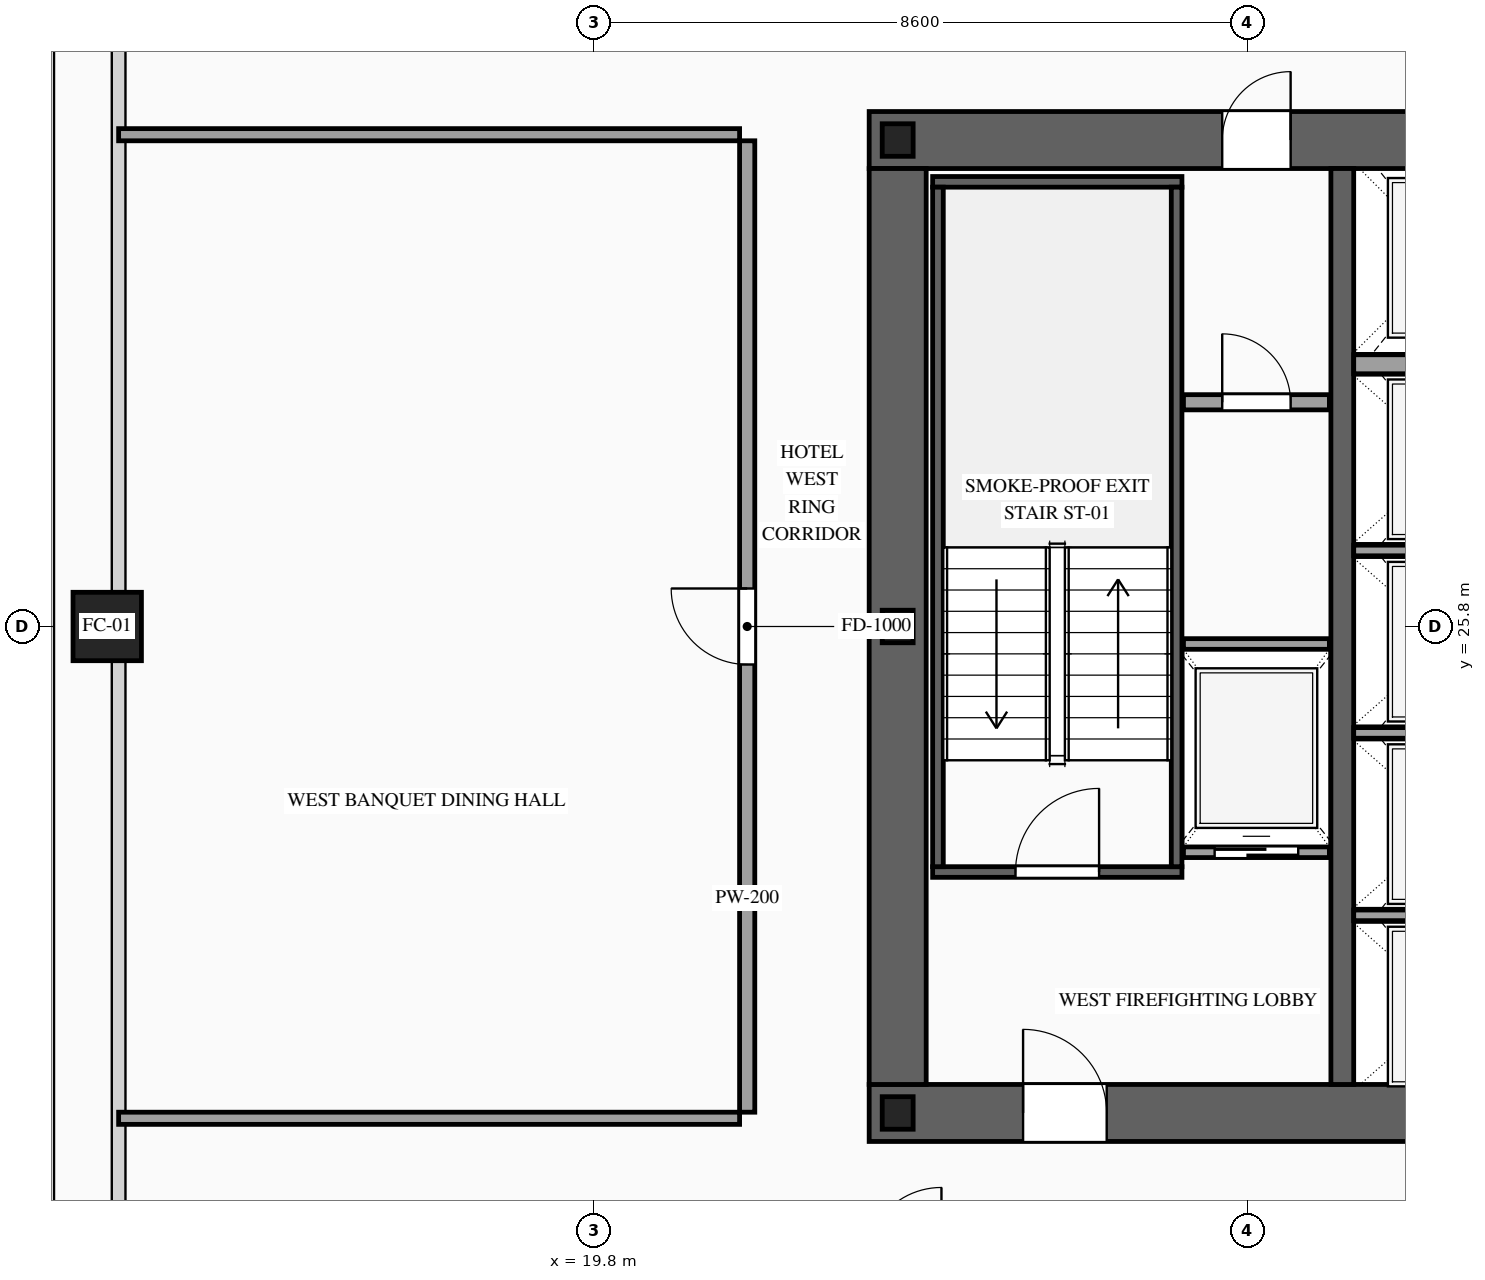
"""IFC4 building model, lengths in metres.
Left out: names, types, materials, properties, quantities, classifications, styles, units other than length and angle.
Written with IfcOpenShell. Run it as: python <this file> out.ifc"""

import sys

from ifc_helpers import new_model, si_unit, direction, frame, frame_2d, origin, origin_2d, place, context, subcontext, project, spatial, rectangle, hollow_rectangle, i_section, extrude, source, transform, mapped, element, fill, save


model = new_model("IFC4")
c1 = context("Model", 3, precision=1e-05, world=origin(), true_north=direction((0.0, 1.0)))
c2 = subcontext(c1, "Body", "Model", "MODEL_VIEW")
j1 = project(units=[si_unit("LENGTHUNIT", "METRE"), si_unit("PLANEANGLEUNIT", "RADIAN")], contexts=[c1])
p1 = place(None, origin())
s1 = spatial("IfcSite", under=j1, at=p1, CompositionType="ELEMENT")
p2 = place(p1, origin())
s2 = spatial("IfcBuilding", under=s1, at=p2, CompositionType="ELEMENT")
p3 = place(p2, frame((0.0, 0.0, 126.2)))
s3 = spatial("IfcBuildingStorey", under=s2, at=p3, CompositionType="ELEMENT", Elevation=126.2)
p4 = place(p3, frame((23.425, 19.4, 0.0), z_axis=(0.0, 0.0, 1.0), x_axis=(1.0, 0.0, 0.0)))
e1 = element("IfcWall", 1, at=p4, inside=s3, PredefinedType="SHEAR", context=c2, shape_type="SweptSolid", body=[
    extrude(rectangle(XDim=27.15, YDim=0.75, at=frame_2d((13.575, 0.0))), origin(), (0.0, 0.0, 1.0), 3.6),
])
p5 = place(p4, frame((2.025, 0.0, 0.0)))
e2 = element("IfcOpeningElement", 2, at=p5, cuts=e1, PredefinedType="OPENING", context=c2, shape_type="SweptSolid", body=[
    extrude(rectangle(XDim=1.1, YDim=2.2, at=frame_2d((0.55, 1.1))), frame((0.0, 0.39, 0.0), z_axis=(0.0, -1.0, 0.0), x_axis=(1.0, 0.0, 0.0)), (0.0, 0.0, 1.0), 0.78),
])
p6 = place(p4, frame((9.925, 0.0, 0.0)))
e3 = element("IfcOpeningElement", 3, at=p6, cuts=e1, PredefinedType="OPENING", context=c2, shape_type="SweptSolid", body=[
    extrude(rectangle(XDim=1.1, YDim=2.2, at=frame_2d((0.55, 1.1))), frame((0.0, 0.39, 0.0), z_axis=(0.0, -1.0, 0.0), x_axis=(1.0, 0.0, 0.0)), (0.0, 0.0, 1.0), 0.78),
])
p7 = place(p4, frame((23.125, 0.0, 0.0)))
e4 = element("IfcOpeningElement", 4, at=p7, cuts=e1, PredefinedType="OPENING", context=c2, shape_type="SweptSolid", body=[
    extrude(rectangle(XDim=1.1, YDim=2.2, at=frame_2d((0.55, 1.1))), frame((0.0, 0.39, 0.0), z_axis=(0.0, -1.0, 0.0), x_axis=(1.0, 0.0, 0.0)), (0.0, 0.0, 1.0), 0.78),
])
p8 = place(p4, frame((19.745, 0.0, 0.0)))
e5 = element("IfcOpeningElement", 5, at=p8, cuts=e1, PredefinedType="OPENING", context=c2, shape_type="SweptSolid", body=[
    extrude(rectangle(XDim=0.9, YDim=2.15, at=frame_2d((0.45, 1.075))), frame((0.0, 0.39, 0.0), z_axis=(0.0, -1.0, 0.0), x_axis=(1.0, 0.0, 0.0)), (0.0, 0.0, 1.0), 0.78),
])
p9 = place(p4, frame((18.305, 0.0, 0.0)))
e6 = element("IfcOpeningElement", 6, at=p9, cuts=e1, PredefinedType="OPENING", context=c2, shape_type="SweptSolid", body=[
    extrude(rectangle(XDim=0.9, YDim=2.15, at=frame_2d((0.45, 1.075))), frame((0.0, 0.39, 0.0), z_axis=(0.0, -1.0, 0.0), x_axis=(1.0, 0.0, 0.0)), (0.0, 0.0, 1.0), 0.78),
])
p10 = place(p3, frame((23.425, 32.2, 0.0), z_axis=(0.0, 0.0, 1.0), x_axis=(1.0, 0.0, 0.0)))
e7 = element("IfcWall", 7, at=p10, inside=s3, PredefinedType="SHEAR", context=c2, shape_type="SweptSolid", body=[
    extrude(rectangle(XDim=27.15, YDim=0.75, at=frame_2d((13.575, 0.0))), origin(), (0.0, 0.0, 1.0), 3.6),
])
p11 = place(p10, frame((4.645, 0.0, 0.0)))
e8 = element("IfcOpeningElement", 8, at=p11, cuts=e7, PredefinedType="OPENING", context=c2, shape_type="SweptSolid", body=[
    extrude(rectangle(XDim=0.9, YDim=2.15, at=frame_2d((0.45, 1.075))), frame((0.0, 0.39, 0.0), z_axis=(0.0, -1.0, 0.0), x_axis=(1.0, 0.0, 0.0)), (0.0, 0.0, 1.0), 0.78),
])
p12 = place(p10, frame((9.925, 0.0, 0.0)))
e9 = element("IfcOpeningElement", 9, at=p12, cuts=e7, PredefinedType="OPENING", context=c2, shape_type="SweptSolid", body=[
    extrude(rectangle(XDim=1.1, YDim=2.2, at=frame_2d((0.55, 1.1))), frame((0.0, 0.39, 0.0), z_axis=(0.0, -1.0, 0.0), x_axis=(1.0, 0.0, 0.0)), (0.0, 0.0, 1.0), 0.78),
])
p13 = place(p10, frame((15.775, 0.0, 0.0)))
e10 = element("IfcOpeningElement", 10, at=p13, cuts=e7, PredefinedType="OPENING", context=c2, shape_type="SweptSolid", body=[
    extrude(rectangle(XDim=1.1, YDim=2.2, at=frame_2d((0.55, 1.1))), frame((0.0, 0.39, 0.0), z_axis=(0.0, -1.0, 0.0), x_axis=(1.0, 0.0, 0.0)), (0.0, 0.0, 1.0), 0.78),
])
m1 = source(origin(), c2, "Body", "SweptSolid", [
    extrude(rectangle(XDim=12.05, YDim=0.75, at=frame_2d((6.025, 0.0))), origin(), (0.0, 0.0, 1.0), 3.6),
])
p14 = place(p3, frame((23.8, 19.775, 0.0), z_axis=(0.0, 0.0, 1.0), x_axis=(0.0, 1.0, 0.0)))
e11 = element("IfcWall", 11, at=p14, inside=s3, PredefinedType="SHEAR", context=c2, shape_type="MappedRepresentation", body=[
    mapped(m1, transform((0.0, 0.0, 0.0), scale=1.0)),
])
m2 = source(origin(), c2, "Body", "SweptSolid", [
    extrude(rectangle(XDim=12.05, YDim=0.3, at=frame_2d((6.025, 0.0))), origin(), (0.0, 0.0, 1.0), 3.6),
])
p15 = place(p3, frame((29.65, 19.775, 0.0), z_axis=(0.0, 0.0, 1.0), x_axis=(0.0, 1.0, 0.0)))
e12 = element("IfcWall", 12, at=p15, inside=s3, PredefinedType="SOLIDWALL", context=c2, shape_type="MappedRepresentation", body=[
    mapped(m2, transform((0.0, 0.0, 0.0), scale=1.0)),
])
m3 = source(origin(), c2, "Body", "SweptSolid", [
    extrude(i_section(OverallWidth=0.407, OverallDepth=0.428, WebThickness=0.02, FlangeThickness=0.035, at=origin_2d()), origin(), (0.0, 0.0, 1.0), 3.6),
])
for number, where, z_axis, x_axis in (
    (13, (23.8, 19.4, 0.0), (0.0, 0.0, 1.0), (1.0, 0.0, 0.0)),
    (14, (23.8, 25.8, 0.0), (0.0, 0.0, 1.0), (1.0, 0.0, 0.0)),
    (15, (23.8, 32.2, 0.0), (0.0, 0.0, 1.0), (1.0, 0.0, 0.0)),
):
    element("IfcColumn", number, at=place(p3, frame(where, z_axis=z_axis, x_axis=x_axis)), inside=s3, PredefinedType="COLUMN", context=c2, shape_type="MappedRepresentation", body=[
        mapped(m3, transform((0.0, 0.0, 0.0), scale=1.0)),
    ])
m4 = source(origin(), c2, "Body", "SweptSolid", [
    extrude(hollow_rectangle(XDim=0.9, YDim=0.9, WallThickness=0.042, at=origin_2d()), origin(), (0.0, 0.0, 1.0), 3.6),
])
p16 = place(p3, frame((13.4, 25.8, 0.0), z_axis=(0.0, 0.0, 1.0), x_axis=(1.0, 0.0, 0.0)))
e16 = element("IfcColumn", 16, at=p16, inside=s3, PredefinedType="COLUMN", context=c2, shape_type="MappedRepresentation", body=[
    mapped(m4, transform((0.0, 0.0, 0.0), scale=1.0)),
])
p17 = place(p3, frame((27.56, 22.83, 0.0), z_axis=(0.0, 0.0, 1.0), x_axis=(1.0, 0.0, 0.0)))
e17 = element("IfcWall", 17, at=p17, inside=s3, PredefinedType="SOLIDWALL", context=c2, shape_type="SweptSolid", body=[
    extrude(rectangle(XDim=1.92, YDim=0.14, at=frame_2d((0.96, 0.0))), origin(), (0.0, 0.0, 1.0), 3.32),
])
p18 = place(p17, frame((0.41, 0.0, 0.0)))
e18 = element("IfcOpeningElement", 18, at=p18, cuts=e17, PredefinedType="OPENING", context=c2, shape_type="SweptSolid", body=[
    extrude(rectangle(XDim=1.1, YDim=2.2, at=frame_2d((0.55, 1.1))), frame((0.0, 0.085, 0.0), z_axis=(0.0, -1.0, 0.0), x_axis=(1.0, 0.0, 0.0)), (0.0, 0.0, 1.0), 0.17),
])
m5 = source(origin(), c2, "Body", "SweptSolid", [
    extrude(rectangle(XDim=1.92, YDim=0.14, at=frame_2d((0.96, 0.0))), origin(), (0.0, 0.0, 1.0), 3.32),
])
p19 = place(p3, frame((27.56, 25.57, 0.0), z_axis=(0.0, 0.0, 1.0), x_axis=(1.0, 0.0, 0.0)))
e19 = element("IfcWall", 19, at=p19, inside=s3, PredefinedType="SOLIDWALL", context=c2, shape_type="MappedRepresentation", body=[
    mapped(m5, transform((0.0, 0.0, 0.0), scale=1.0)),
])
m6 = source(origin(), c2, "Body", "SweptSolid", [
    extrude(rectangle(XDim=2.5, YDim=0.14, at=frame_2d((1.25, 0.0))), origin(), (0.0, 0.0, 1.0), 3.32),
])
for number, where, z_axis, x_axis in (
    (20, (29.8, 22.0, 0.0), (0.0, 0.0, 1.0), (1.0, 0.0, 0.0)),
    (21, (29.8, 24.4, 0.0), (0.0, 0.0, 1.0), (1.0, 0.0, 0.0)),
    (22, (29.8, 26.8, 0.0), (0.0, 0.0, 1.0), (1.0, 0.0, 0.0)),
):
    element("IfcWall", number, at=place(p3, frame(where, z_axis=z_axis, x_axis=x_axis)), inside=s3, PredefinedType="SOLIDWALL", context=c2, shape_type="MappedRepresentation", body=[
        mapped(m6, transform((0.0, 0.0, 0.0), scale=1.0)),
    ])
m7 = source(origin(), c2, "Body", "SweptSolid", [
    extrude(rectangle(XDim=2.5, YDim=0.25, at=frame_2d((1.25, 0.0))), origin(), (0.0, 0.0, 1.0), 3.32),
])
p20 = place(p3, frame((29.8, 29.25, 0.0), z_axis=(0.0, 0.0, 1.0), x_axis=(1.0, 0.0, 0.0)))
e23 = element("IfcWall", 23, at=p20, inside=s3, PredefinedType="SOLIDWALL", context=c2, shape_type="MappedRepresentation", body=[
    mapped(m7, transform((0.0, 0.0, 0.0), scale=1.0)),
])
p21 = place(p3, frame((24.26, 22.57, 0.0), z_axis=(0.0, 0.0, 1.0), x_axis=(1.0, 0.0, 0.0)))
e24 = element("IfcWall", 24, at=p21, inside=s3, PredefinedType="SOLIDWALL", context=c2, shape_type="SweptSolid", body=[
    extrude(rectangle(XDim=3.28, YDim=0.14, at=frame_2d((1.64, 0.0))), origin(), (0.0, 0.0, 1.0), 3.32),
])
p22 = place(p21, frame((1.09, 0.0, 0.0)))
e25 = element("IfcOpeningElement", 25, at=p22, cuts=e24, PredefinedType="OPENING", context=c2, shape_type="SweptSolid", body=[
    extrude(rectangle(XDim=1.1, YDim=2.2, at=frame_2d((0.55, 1.1))), frame((0.0, 0.085, 0.0), z_axis=(0.0, -1.0, 0.0), x_axis=(1.0, 0.0, 0.0)), (0.0, 0.0, 1.0), 0.17),
])
m8 = source(origin(), c2, "Body", "SweptSolid", [
    extrude(rectangle(XDim=3.28, YDim=0.14, at=frame_2d((1.64, 0.0))), origin(), (0.0, 0.0, 1.0), 3.32),
])
p23 = place(p3, frame((24.26, 31.65, 0.0), z_axis=(0.0, 0.0, 1.0), x_axis=(1.0, 0.0, 0.0)))
e26 = element("IfcWall", 26, at=p23, inside=s3, PredefinedType="SOLIDWALL", context=c2, shape_type="MappedRepresentation", body=[
    mapped(m8, transform((0.0, 0.0, 0.0), scale=1.0)),
])
m9 = source(origin(), c2, "Body", "SweptSolid", [
    extrude(rectangle(XDim=8.94, YDim=0.14, at=frame_2d((4.47, 0.0))), origin(), (0.0, 0.0, 1.0), 3.32),
])
for number, where, z_axis, x_axis in (
    (27, (24.33, 22.64, 0.0), (0.0, 0.0, 1.0), (0.0, 1.0, 0.0)),
    (28, (27.47, 22.64, 0.0), (0.0, 0.0, 1.0), (0.0, 1.0, 0.0)),
):
    element("IfcWall", number, at=place(p3, frame(where, z_axis=z_axis, x_axis=x_axis)), inside=s3, PredefinedType="SOLIDWALL", context=c2, shape_type="MappedRepresentation", body=[
        mapped(m9, transform((0.0, 0.0, 0.0), scale=1.0)),
    ])
p24 = place(p3, frame((27.56, 28.75, 0.0), z_axis=(0.0, 0.0, 1.0), x_axis=(1.0, 0.0, 0.0)))
e29 = element("IfcWall", 29, at=p24, inside=s3, PredefinedType="PARTITIONING", context=c2, shape_type="SweptSolid", body=[
    extrude(rectangle(XDim=1.92, YDim=0.2, at=frame_2d((0.96, 0.0))), origin(), (0.0, 0.0, 1.0), 3.32),
])
p25 = place(p24, frame((0.51, 0.0, 0.0)))
e30 = element("IfcOpeningElement", 30, at=p25, cuts=e29, PredefinedType="OPENING", context=c2, shape_type="SweptSolid", body=[
    extrude(rectangle(XDim=0.9, YDim=2.15, at=frame_2d((0.45, 1.075))), frame((0.0, 0.115, 0.0), z_axis=(0.0, -1.0, 0.0), x_axis=(1.0, 0.0, 0.0)), (0.0, 0.0, 1.0), 0.23),
])
p26 = place(p3, frame((21.82, 19.41, 0.0), z_axis=(0.0, 0.0, 1.0), x_axis=(0.0, 1.0, 0.0)))
e31 = element("IfcWall", 31, at=p26, inside=s3, PredefinedType="PARTITIONING", context=c2, shape_type="SweptSolid", body=[
    extrude(rectangle(XDim=12.78, YDim=0.2, at=frame_2d((6.39, 0.0))), origin(), (0.0, 0.0, 1.0), 3.32),
])
p27 = place(p26, frame((5.89, 0.0, 0.0)))
e32 = element("IfcOpeningElement", 32, at=p27, cuts=e31, PredefinedType="OPENING", context=c2, shape_type="SweptSolid", body=[
    extrude(rectangle(XDim=1.0, YDim=2.2, at=frame_2d((0.5, 1.1))), frame((0.0, 0.115, 0.0), z_axis=(0.0, -1.0, 0.0), x_axis=(1.0, 0.0, 0.0)), (0.0, 0.0, 1.0), 0.23),
])
m10 = source(origin(), c2, "Body", "SweptSolid", [
    extrude(rectangle(XDim=8.17, YDim=0.16, at=frame_2d((4.085, 0.0))), origin(), (0.0, 0.0, 1.0), 2.815),
])
for number, where, z_axis, x_axis in (
    (33, (13.55, 19.33, 0.0), (0.0, 0.0, 1.0), (1.0, 0.0, 0.0)),
    (34, (13.55, 32.27, 0.0), (0.0, 0.0, 1.0), (1.0, 0.0, 0.0)),
):
    element("IfcWall", number, at=place(p3, frame(where, z_axis=z_axis, x_axis=x_axis)), inside=s3, PredefinedType="PARTITIONING", context=c2, shape_type="MappedRepresentation", body=[
        mapped(m10, transform((0.0, 0.0, 0.0), scale=1.0)),
    ])
m11 = source(origin(), c2, "Body", "SweptSolid", [
    extrude(rectangle(XDim=1.1, YDim=2.2, at=frame_2d((0.55, 1.1))), frame((0.0, 0.025, 0.0), z_axis=(0.0, -1.0, 0.0), x_axis=(1.0, 0.0, 0.0)), (0.0, 0.0, 1.0), 0.05),
])
p28 = place(p18, origin())
e35 = element("IfcDoor", 35, at=p28, inside=s3, OperationType="SLIDING_TO_LEFT", PredefinedType="DOOR", context=c2, shape_type="MappedRepresentation", body=[
    mapped(m11, transform((0.0, 0.0, 0.0), scale=1.0)),
])
fill(e18, e35)
m12 = source(origin(), c2, "Body", "SweptSolid", [
    extrude(rectangle(XDim=1.1, YDim=2.2, at=frame_2d((0.55, 1.1))), frame((0.0, 0.025, 0.0), z_axis=(0.0, -1.0, 0.0), x_axis=(1.0, 0.0, 0.0)), (0.0, 0.0, 1.0), 0.05),
])
p29 = place(p22, origin())
e36 = element("IfcDoor", 36, at=p29, inside=s3, OperationType="SINGLE_SWING_RIGHT", PredefinedType="DOOR", context=c2, shape_type="MappedRepresentation", body=[
    mapped(m12, transform((0.0, 0.0, 0.0), scale=1.0)),
])
fill(e25, e36)
p30 = place(p5, origin())
e37 = element("IfcDoor", 37, at=p30, inside=s3, OperationType="SINGLE_SWING_LEFT", PredefinedType="DOOR", context=c2, shape_type="MappedRepresentation", body=[
    mapped(m12, transform((0.0, 0.0, 0.0), scale=1.0)),
])
fill(e2, e37)
m13 = source(origin(), c2, "Body", "SweptSolid", [
    extrude(rectangle(XDim=0.9, YDim=2.15, at=frame_2d((0.45, 1.075))), frame((0.0, 0.025, 0.0), z_axis=(0.0, -1.0, 0.0), x_axis=(1.0, 0.0, 0.0)), (0.0, 0.0, 1.0), 0.05),
])
p31 = place(p11, origin())
e38 = element("IfcDoor", 38, at=p31, inside=s3, OperationType="SINGLE_SWING_RIGHT", PredefinedType="DOOR", context=c2, shape_type="MappedRepresentation", body=[
    mapped(m13, transform((0.0, 0.0, 0.0), scale=1.0)),
])
fill(e8, e38)
p32 = place(p25, origin())
e39 = element("IfcDoor", 39, at=p32, inside=s3, OperationType="SINGLE_SWING_LEFT", PredefinedType="DOOR", context=c2, shape_type="MappedRepresentation", body=[
    mapped(m13, transform((0.0, 0.0, 0.0), scale=1.0)),
])
fill(e30, e39)
m14 = source(origin(), c2, "Body", "SweptSolid", [
    extrude(rectangle(XDim=1.0, YDim=2.2, at=frame_2d((0.5, 1.1))), frame((0.0, 0.025, 0.0), z_axis=(0.0, -1.0, 0.0), x_axis=(1.0, 0.0, 0.0)), (0.0, 0.0, 1.0), 0.05),
])
p33 = place(p27, origin())
e40 = element("IfcDoor", 40, at=p33, inside=s3, OperationType="SINGLE_SWING_RIGHT", PredefinedType="DOOR", context=c2, shape_type="MappedRepresentation", body=[
    mapped(m14, transform((0.0, 0.0, 0.0), scale=1.0)),
])
fill(e32, e40)
save(model, sys.argv[1])
